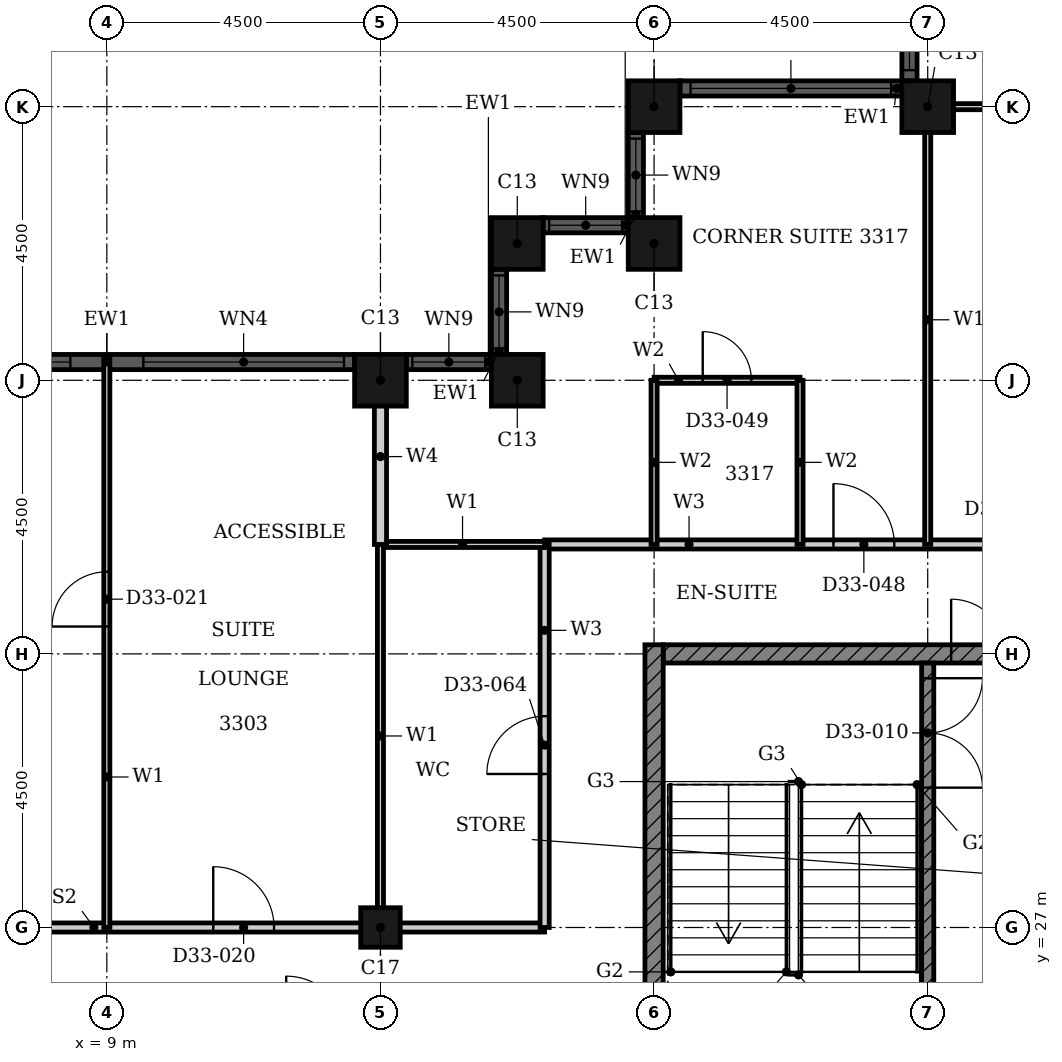
"""IFC4 building model, lengths in metres.
Left out: names, types, materials, properties, quantities, classifications, styles, units other than length and angle.
Written with IfcOpenShell. Run it as: python <this file> out.ifc"""

import sys

from ifc_helpers import new_model, si_unit, direction, frame, frame_2d, origin, origin_2d, place, context, subcontext, project, spatial, rectangle, hollow_rectangle, extrude, element, fill, save


model = new_model("IFC4")
c1 = context("Model", 3, precision=1e-05, world=origin(), true_north=direction((0.0, 1.0)))
c2 = subcontext(c1, "Body", "Model", "MODEL_VIEW")
j1 = project(units=[si_unit("LENGTHUNIT", "METRE"), si_unit("PLANEANGLEUNIT", "RADIAN")], contexts=[c1])
p1 = place(None, origin())
s1 = spatial("IfcSite", under=j1, at=p1, CompositionType="ELEMENT")
p2 = place(p1, origin())
s2 = spatial("IfcBuilding", under=s1, at=p2, CompositionType="ELEMENT")
p3 = place(p2, frame((0.0, 0.0, 133.2)))
s3 = spatial("IfcBuildingStorey", under=s2, at=p3, CompositionType="ELEMENT", Elevation=133.2)
for number, where, z_axis, x_axis in (
    (1, (22.5, 40.5, 0.0), (0.0, 0.0, 1.0), (1.0, 0.0, 0.0)),
    (2, (18.0, 40.5, 0.0), (0.0, 0.0, 1.0), (1.0, 0.0, 0.0)),
    (3, (18.0, 38.25, 0.0), (0.0, 0.0, 1.0), (1.0, 0.0, 0.0)),
    (4, (15.75, 38.25, 0.0), (0.0, 0.0, 1.0), (1.0, 0.0, 0.0)),
    (5, (15.75, 36.0, 0.0), (0.0, 0.0, 1.0), (1.0, 0.0, 0.0)),
    (6, (13.5, 36.0, 0.0), (0.0, 0.0, 1.0), (1.0, 0.0, 0.0)),
):
    element("IfcColumn", number, at=place(p3, frame(where, z_axis=z_axis, x_axis=x_axis)), inside=s3, PredefinedType="COLUMN", context=c2, shape_type="SweptSolid", body=[
        extrude(hollow_rectangle(XDim=0.85, YDim=0.85, WallThickness=0.026, at=origin_2d()), origin(), (0.0, 0.0, 1.0), 3.6),
    ])
p4 = place(p3, frame((13.5, 27.0, 0.0), z_axis=(0.0, 0.0, 1.0), x_axis=(1.0, 0.0, 0.0)))
e7 = element("IfcColumn", 7, at=p4, inside=s3, PredefinedType="COLUMN", context=c2, shape_type="SweptSolid", body=[
    extrude(hollow_rectangle(XDim=0.65, YDim=0.65, WallThickness=0.021, at=origin_2d()), origin(), (0.0, 0.0, 1.0), 3.6),
])
p5 = place(p3, frame((22.2, 49.075, 0.0), z_axis=(0.0, 0.0, 1.0), x_axis=(0.0, -1.0, 0.0)))
e8 = element("IfcWall", 8, at=p5, inside=s3, PredefinedType="SOLIDWALL", context=c2, shape_type="SweptSolid", body=[
    extrude(rectangle(XDim=8.15, YDim=0.25, at=frame_2d((4.075, 0.0))), origin(), (0.0, 0.0, 1.0), 3.6),
])
p6 = place(p5, frame((0.175, 0.0, 0.9)))
e9 = element("IfcOpeningElement", 9, at=p6, cuts=e8, PredefinedType="OPENING", context=c2, shape_type="SweptSolid", body=[
    extrude(rectangle(XDim=3.3, YDim=2.08, at=frame_2d((1.65, 1.04))), frame((0.0, 0.135, 0.0), z_axis=(0.0, -1.0, 0.0), x_axis=(1.0, 0.0, 0.0)), (0.0, 0.0, 1.0), 0.27),
])
p7 = place(p5, frame((4.675, 0.0, 0.9)))
e10 = element("IfcOpeningElement", 10, at=p7, cuts=e8, PredefinedType="OPENING", context=c2, shape_type="SweptSolid", body=[
    extrude(rectangle(XDim=3.3, YDim=2.08, at=frame_2d((1.65, 1.04))), frame((0.0, 0.135, 0.0), z_axis=(0.0, -1.0, 0.0), x_axis=(1.0, 0.0, 0.0)), (0.0, 0.0, 1.0), 0.27),
])
p8 = place(p3, frame((22.075, 40.8, 0.0), z_axis=(0.0, 0.0, 1.0), x_axis=(-1.0, 0.0, 0.0)))
e11 = element("IfcWall", 11, at=p8, inside=s3, PredefinedType="SOLIDWALL", context=c2, shape_type="SweptSolid", body=[
    extrude(rectangle(XDim=3.65, YDim=0.25, at=frame_2d((1.825, 0.0))), origin(), (0.0, 0.0, 1.0), 3.6),
])
p9 = place(p8, frame((0.175, 0.0, 0.9)))
e12 = element("IfcOpeningElement", 12, at=p9, cuts=e11, PredefinedType="OPENING", context=c2, shape_type="SweptSolid", body=[
    extrude(rectangle(XDim=3.3, YDim=2.08, at=frame_2d((1.65, 1.04))), frame((0.0, 0.135, 0.0), z_axis=(0.0, -1.0, 0.0), x_axis=(1.0, 0.0, 0.0)), (0.0, 0.0, 1.0), 0.27),
])
p10 = place(p3, frame((17.7, 40.075, 0.0), z_axis=(0.0, 0.0, 1.0), x_axis=(0.0, -1.0, 0.0)))
e13 = element("IfcWall", 13, at=p10, inside=s3, PredefinedType="SOLIDWALL", context=c2, shape_type="SweptSolid", body=[
    extrude(rectangle(XDim=1.4, YDim=0.25, at=frame_2d((0.7, 0.0))), origin(), (0.0, 0.0, 1.0), 3.6),
])
p11 = place(p10, frame((0.1, 0.0, 0.9)))
e14 = element("IfcOpeningElement", 14, at=p11, cuts=e13, PredefinedType="OPENING", context=c2, shape_type="SweptSolid", body=[
    extrude(rectangle(XDim=1.2, YDim=2.08, at=frame_2d((0.6, 1.04))), frame((0.0, 0.135, 0.0), z_axis=(0.0, -1.0, 0.0), x_axis=(1.0, 0.0, 0.0)), (0.0, 0.0, 1.0), 0.27),
])
p12 = place(p3, frame((17.575, 38.55, 0.0), z_axis=(0.0, 0.0, 1.0), x_axis=(-1.0, 0.0, 0.0)))
e15 = element("IfcWall", 15, at=p12, inside=s3, PredefinedType="SOLIDWALL", context=c2, shape_type="SweptSolid", body=[
    extrude(rectangle(XDim=1.4, YDim=0.25, at=frame_2d((0.7, 0.0))), origin(), (0.0, 0.0, 1.0), 3.6),
])
p13 = place(p12, frame((0.1, 0.0, 0.9)))
e16 = element("IfcOpeningElement", 16, at=p13, cuts=e15, PredefinedType="OPENING", context=c2, shape_type="SweptSolid", body=[
    extrude(rectangle(XDim=1.2, YDim=2.08, at=frame_2d((0.6, 1.04))), frame((0.0, 0.135, 0.0), z_axis=(0.0, -1.0, 0.0), x_axis=(1.0, 0.0, 0.0)), (0.0, 0.0, 1.0), 0.27),
])
p14 = place(p3, frame((15.45, 37.825, 0.0), z_axis=(0.0, 0.0, 1.0), x_axis=(0.0, -1.0, 0.0)))
e17 = element("IfcWall", 17, at=p14, inside=s3, PredefinedType="SOLIDWALL", context=c2, shape_type="SweptSolid", body=[
    extrude(rectangle(XDim=1.4, YDim=0.25, at=frame_2d((0.7, 0.0))), origin(), (0.0, 0.0, 1.0), 3.6),
])
p15 = place(p14, frame((0.1, 0.0, 0.9)))
e18 = element("IfcOpeningElement", 18, at=p15, cuts=e17, PredefinedType="OPENING", context=c2, shape_type="SweptSolid", body=[
    extrude(rectangle(XDim=1.2, YDim=2.08, at=frame_2d((0.6, 1.04))), frame((0.0, 0.135, 0.0), z_axis=(0.0, -1.0, 0.0), x_axis=(1.0, 0.0, 0.0)), (0.0, 0.0, 1.0), 0.27),
])
p16 = place(p3, frame((15.325, 36.3, 0.0), z_axis=(0.0, 0.0, 1.0), x_axis=(-1.0, 0.0, 0.0)))
e19 = element("IfcWall", 19, at=p16, inside=s3, PredefinedType="SOLIDWALL", context=c2, shape_type="SweptSolid", body=[
    extrude(rectangle(XDim=1.4, YDim=0.25, at=frame_2d((0.7, 0.0))), origin(), (0.0, 0.0, 1.0), 3.6),
])
p17 = place(p16, frame((0.1, 0.0, 0.9)))
e20 = element("IfcOpeningElement", 20, at=p17, cuts=e19, PredefinedType="OPENING", context=c2, shape_type="SweptSolid", body=[
    extrude(rectangle(XDim=1.2, YDim=2.08, at=frame_2d((0.6, 1.04))), frame((0.0, 0.135, 0.0), z_axis=(0.0, -1.0, 0.0), x_axis=(1.0, 0.0, 0.0)), (0.0, 0.0, 1.0), 0.27),
])
p18 = place(p3, frame((13.075, 36.3, 0.0), z_axis=(0.0, 0.0, 1.0), x_axis=(-1.0, 0.0, 0.0)))
e21 = element("IfcWall", 21, at=p18, inside=s3, PredefinedType="SOLIDWALL", context=c2, shape_type="SweptSolid", body=[
    extrude(rectangle(XDim=8.15, YDim=0.25, at=frame_2d((4.075, 0.0))), origin(), (0.0, 0.0, 1.0), 3.6),
])
p19 = place(p18, frame((0.175, 0.0, 0.9)))
e22 = element("IfcOpeningElement", 22, at=p19, cuts=e21, PredefinedType="OPENING", context=c2, shape_type="SweptSolid", body=[
    extrude(rectangle(XDim=3.3, YDim=2.08, at=frame_2d((1.65, 1.04))), frame((0.0, 0.135, 0.0), z_axis=(0.0, -1.0, 0.0), x_axis=(1.0, 0.0, 0.0)), (0.0, 0.0, 1.0), 0.27),
])
p20 = place(p18, frame((4.675, 0.0, 0.9)))
e23 = element("IfcOpeningElement", 23, at=p20, cuts=e21, PredefinedType="OPENING", context=c2, shape_type="SweptSolid", body=[
    extrude(rectangle(XDim=3.3, YDim=2.08, at=frame_2d((1.65, 1.04))), frame((0.0, 0.135, 0.0), z_axis=(0.0, -1.0, 0.0), x_axis=(1.0, 0.0, 0.0)), (0.0, 0.0, 1.0), 0.27),
])
p21 = place(p3, frame((18.15, 31.5, 0.0), z_axis=(0.0, 0.0, 1.0), x_axis=(1.0, 0.0, 0.0)))
e24 = element("IfcWall", 24, at=p21, inside=s3, PredefinedType="SHEAR", context=c2, shape_type="SweptSolid", body=[
    extrude(rectangle(XDim=6.797, YDim=0.3, at=frame_2d((3.398, 0.0))), origin(), (0.0, 0.0, 1.0), 3.3),
])
p22 = place(p21, frame((4.736, 0.0, 0.0)))
e25 = element("IfcOpeningElement", 25, at=p22, cuts=e24, PredefinedType="OPENING", context=c2, shape_type="SweptSolid", body=[
    extrude(rectangle(XDim=1.8, YDim=2.1, at=frame_2d((0.9, 1.05))), frame((0.0, 0.16, 0.0), z_axis=(0.0, -1.0, 0.0), x_axis=(1.0, 0.0, 0.0)), (0.0, 0.0, 1.0), 0.32),
])
p23 = place(p3, frame((18.0, 22.35, 0.0), z_axis=(0.0, 0.0, 1.0), x_axis=(0.0, 1.0, 0.0)))
e26 = element("IfcWall", 26, at=p23, inside=s3, PredefinedType="SHEAR", context=c2, shape_type="SweptSolid", body=[
    extrude(rectangle(XDim=9.3, YDim=0.3, at=frame_2d((4.65, 0.0))), origin(), (0.0, 0.0, 1.0), 3.3),
])
p24 = place(p3, frame((22.5, 31.35, 0.0), z_axis=(0.0, 0.0, 1.0), x_axis=(0.0, -1.0, 0.0)))
e27 = element("IfcWall", 27, at=p24, inside=s3, PredefinedType="SHEAR", context=c2, shape_type="SweptSolid", body=[
    extrude(rectangle(XDim=5.825, YDim=0.2, at=frame_2d((2.913, 0.0))), origin(), (0.0, 0.0, 1.0), 3.3),
])
p25 = place(p24, frame((0.25, 0.0, 0.0)))
e28 = element("IfcOpeningElement", 28, at=p25, cuts=e27, PredefinedType="OPENING", context=c2, shape_type="SweptSolid", body=[
    extrude(rectangle(XDim=1.8, YDim=2.1, at=frame_2d((0.9, 1.05))), frame((0.0, 0.11, 0.0), z_axis=(0.0, -1.0, 0.0), x_axis=(1.0, 0.0, 0.0)), (0.0, 0.0, 1.0), 0.22),
])
p26 = place(p3, frame((4.5, 27.0, 0.0), z_axis=(0.0, 0.0, 1.0), x_axis=(1.0, 0.0, 0.0)))
e29 = element("IfcWall", 29, at=p26, inside=s3, PredefinedType="PARTITIONING", context=c2, shape_type="SweptSolid", body=[
    extrude(rectangle(XDim=11.7, YDim=0.15, at=frame_2d((5.85, 0.0))), origin(), (0.0, 0.0, 1.0), 2.58),
])
p27 = place(p26, frame((6.25, 0.0, 0.0)))
e30 = element("IfcOpeningElement", 30, at=p27, cuts=e29, PredefinedType="OPENING", context=c2, shape_type="SweptSolid", body=[
    extrude(rectangle(XDim=1.0, YDim=2.1, at=frame_2d((0.5, 1.05))), frame((0.0, 0.085, 0.0), z_axis=(0.0, -1.0, 0.0), x_axis=(1.0, 0.0, 0.0)), (0.0, 0.0, 1.0), 0.17),
])
p28 = place(p3, frame((16.2, 33.3, 0.0), z_axis=(0.0, 0.0, 1.0), x_axis=(1.0, 0.0, 0.0)))
e31 = element("IfcWall", 31, at=p28, inside=s3, PredefinedType="PARTITIONING", context=c2, shape_type="SweptSolid", body=[
    extrude(rectangle(XDim=15.3, YDim=0.15, at=frame_2d((7.65, 0.0))), origin(), (0.0, 0.0, 1.0), 3.3),
])
p29 = place(p28, frame((4.75, 0.0, 0.0)))
e32 = element("IfcOpeningElement", 32, at=p29, cuts=e31, PredefinedType="OPENING", context=c2, shape_type="SweptSolid", body=[
    extrude(rectangle(XDim=1.0, YDim=2.1, at=frame_2d((0.5, 1.05))), frame((0.0, 0.085, 0.0), z_axis=(0.0, -1.0, 0.0), x_axis=(1.0, 0.0, 0.0)), (0.0, 0.0, 1.0), 0.17),
])
p30 = place(p28, frame((10.35, 0.0, 0.0)))
e33 = element("IfcOpeningElement", 33, at=p30, cuts=e31, PredefinedType="OPENING", context=c2, shape_type="SweptSolid", body=[
    extrude(rectangle(XDim=0.9, YDim=2.1, at=frame_2d((0.45, 1.05))), frame((0.0, 0.085, 0.0), z_axis=(0.0, -1.0, 0.0), x_axis=(1.0, 0.0, 0.0)), (0.0, 0.0, 1.0), 0.17),
])
p31 = place(p3, frame((16.2, 27.0, 0.0), z_axis=(0.0, 0.0, 1.0), x_axis=(0.0, 1.0, 0.0)))
e34 = element("IfcWall", 34, at=p31, inside=s3, PredefinedType="PARTITIONING", context=c2, shape_type="SweptSolid", body=[
    extrude(rectangle(XDim=6.3, YDim=0.15, at=frame_2d((3.15, 0.0))), origin(), (0.0, 0.0, 1.0), 3.3),
])
p32 = place(p31, frame((2.525, 0.0, 0.0)))
e35 = element("IfcOpeningElement", 35, at=p32, cuts=e34, PredefinedType="OPENING", context=c2, shape_type="SweptSolid", body=[
    extrude(rectangle(XDim=0.95, YDim=2.1, at=frame_2d((0.475, 1.05))), frame((0.0, 0.085, 0.0), z_axis=(0.0, -1.0, 0.0), x_axis=(1.0, 0.0, 0.0)), (0.0, 0.0, 1.0), 0.17),
])
p33 = place(p3, frame((13.5, 33.3, 0.0), z_axis=(0.0, 0.0, 1.0), x_axis=(1.0, 0.0, 0.0)))
e36 = element("IfcWall", 36, at=p33, inside=s3, PredefinedType="PARTITIONING", context=c2, shape_type="SweptSolid", body=[
    extrude(rectangle(XDim=2.7, YDim=0.1, at=frame_2d((1.35, 0.0))), origin(), (0.0, 0.0, 1.0), 3.3),
])
p34 = place(p3, frame((22.31, 40.5, 0.0), z_axis=(0.0, 0.0, 1.0), x_axis=(1.0, 0.0, 0.0)))
e37 = element("IfcWall", 37, at=p34, inside=s3, PredefinedType="PARTITIONING", context=c2, shape_type="SweptSolid", body=[
    extrude(rectangle(XDim=9.19, YDim=0.1, at=frame_2d((4.595, 0.0))), origin(), (0.0, 0.0, 1.0), 2.38),
])
p35 = place(p3, frame((13.5, 27.0, 0.0), z_axis=(0.0, 0.0, 1.0), x_axis=(0.0, 1.0, 0.0)))
e38 = element("IfcWall", 38, at=p35, inside=s3, PredefinedType="PARTITIONING", context=c2, shape_type="SweptSolid", body=[
    extrude(rectangle(XDim=6.3, YDim=0.1, at=frame_2d((3.15, 0.0))), origin(), (0.0, 0.0, 1.0), 2.38),
])
p36 = place(p3, frame((22.5, 33.3, 0.0), z_axis=(0.0, 0.0, 1.0), x_axis=(0.0, 1.0, 0.0)))
e39 = element("IfcWall", 39, at=p36, inside=s3, PredefinedType="PARTITIONING", context=c2, shape_type="SweptSolid", body=[
    extrude(rectangle(XDim=7.39, YDim=0.1, at=frame_2d((3.695, 0.0))), origin(), (0.0, 0.0, 1.0), 3.3),
])
p37 = place(p3, frame((9.0, 27.0, 0.0), z_axis=(0.0, 0.0, 1.0), x_axis=(0.0, 1.0, 0.0)))
e40 = element("IfcWall", 40, at=p37, inside=s3, PredefinedType="PARTITIONING", context=c2, shape_type="SweptSolid", body=[
    extrude(rectangle(XDim=9.365, YDim=0.1, at=frame_2d((4.683, 0.0))), origin(), (0.0, 0.0, 1.0), 3.3),
])
p38 = place(p37, frame((4.95, 0.0, 0.0)))
e41 = element("IfcOpeningElement", 41, at=p38, cuts=e40, PredefinedType="OPENING", context=c2, shape_type="SweptSolid", body=[
    extrude(rectangle(XDim=0.9, YDim=2.1, at=frame_2d((0.45, 1.05))), frame((0.0, 0.06, 0.0), z_axis=(0.0, -1.0, 0.0), x_axis=(1.0, 0.0, 0.0)), (0.0, 0.0, 1.0), 0.12),
])
p39 = place(p3, frame((13.5, 33.3, 0.0), z_axis=(0.0, 0.0, 1.0), x_axis=(0.0, 1.0, 0.0)))
e42 = element("IfcWall", 42, at=p39, inside=s3, PredefinedType="PARTITIONING", context=c2, shape_type="SweptSolid", body=[
    extrude(rectangle(XDim=2.89, YDim=0.2, at=frame_2d((1.445, 0.0))), origin(), (0.0, 0.0, 1.0), 2.38),
])
p40 = place(p3, frame((18.0, 36.0, 0.0), z_axis=(0.0, 0.0, 1.0), x_axis=(1.0, 0.0, 0.0)))
e43 = element("IfcWall", 43, at=p40, inside=s3, PredefinedType="PARTITIONING", context=c2, shape_type="SweptSolid", body=[
    extrude(rectangle(XDim=2.4, YDim=0.1, at=frame_2d((1.2, 0.0))), origin(), (0.0, 0.0, 1.0), 3.3),
])
p41 = place(p40, frame((0.8, 0.0, 0.0)))
e44 = element("IfcOpeningElement", 44, at=p41, cuts=e43, PredefinedType="OPENING", context=c2, shape_type="SweptSolid", body=[
    extrude(rectangle(XDim=0.8, YDim=2.1, at=frame_2d((0.4, 1.05))), frame((0.0, 0.06, 0.0), z_axis=(0.0, -1.0, 0.0), x_axis=(1.0, 0.0, 0.0)), (0.0, 0.0, 1.0), 0.12),
])
for number, where, z_axis, x_axis in (
    (45, (18.0, 33.3, 0.0), (0.0, 0.0, 1.0), (0.0, 1.0, 0.0)),
    (46, (20.4, 33.3, 0.0), (0.0, 0.0, 1.0), (0.0, 1.0, 0.0)),
):
    element("IfcWall", number, at=place(p3, frame(where, z_axis=z_axis, x_axis=x_axis)), inside=s3, PredefinedType="PARTITIONING", context=c2, shape_type="SweptSolid", body=[
        extrude(rectangle(XDim=2.7, YDim=0.1, at=frame_2d((1.35, 0.0))), origin(), (0.0, 0.0, 1.0), 3.3),
    ])
p42 = place(p7, origin())
e47 = element("IfcWindow", 47, at=p42, inside=s3, PartitioningType="SINGLE_PANEL", PredefinedType="WINDOW", context=c2, shape_type="SweptSolid", body=[
    extrude(rectangle(XDim=3.3, YDim=2.08, at=frame_2d((1.65, 1.04))), frame((0.0, 0.03, 0.0), z_axis=(0.0, -1.0, 0.0), x_axis=(1.0, 0.0, 0.0)), (0.0, 0.0, 1.0), 0.06),
])
fill(e10, e47)
p43 = place(p9, origin())
e48 = element("IfcWindow", 48, at=p43, inside=s3, PartitioningType="SINGLE_PANEL", PredefinedType="WINDOW", context=c2, shape_type="SweptSolid", body=[
    extrude(rectangle(XDim=3.3, YDim=2.08, at=frame_2d((1.65, 1.04))), frame((0.0, 0.03, 0.0), z_axis=(0.0, -1.0, 0.0), x_axis=(1.0, 0.0, 0.0)), (0.0, 0.0, 1.0), 0.06),
])
fill(e12, e48)
p44 = place(p11, origin())
e49 = element("IfcWindow", 49, at=p44, inside=s3, PartitioningType="SINGLE_PANEL", PredefinedType="WINDOW", context=c2, shape_type="SweptSolid", body=[
    extrude(rectangle(XDim=1.2, YDim=2.08, at=frame_2d((0.6, 1.04))), frame((0.0, 0.03, 0.0), z_axis=(0.0, -1.0, 0.0), x_axis=(1.0, 0.0, 0.0)), (0.0, 0.0, 1.0), 0.06),
])
fill(e14, e49)
p45 = place(p13, origin())
e50 = element("IfcWindow", 50, at=p45, inside=s3, PartitioningType="SINGLE_PANEL", PredefinedType="WINDOW", context=c2, shape_type="SweptSolid", body=[
    extrude(rectangle(XDim=1.2, YDim=2.08, at=frame_2d((0.6, 1.04))), frame((0.0, 0.03, 0.0), z_axis=(0.0, -1.0, 0.0), x_axis=(1.0, 0.0, 0.0)), (0.0, 0.0, 1.0), 0.06),
])
fill(e16, e50)
p46 = place(p15, origin())
e51 = element("IfcWindow", 51, at=p46, inside=s3, PartitioningType="SINGLE_PANEL", PredefinedType="WINDOW", context=c2, shape_type="SweptSolid", body=[
    extrude(rectangle(XDim=1.2, YDim=2.08, at=frame_2d((0.6, 1.04))), frame((0.0, 0.03, 0.0), z_axis=(0.0, -1.0, 0.0), x_axis=(1.0, 0.0, 0.0)), (0.0, 0.0, 1.0), 0.06),
])
fill(e18, e51)
p47 = place(p17, origin())
e52 = element("IfcWindow", 52, at=p47, inside=s3, PartitioningType="SINGLE_PANEL", PredefinedType="WINDOW", context=c2, shape_type="SweptSolid", body=[
    extrude(rectangle(XDim=1.2, YDim=2.08, at=frame_2d((0.6, 1.04))), frame((0.0, 0.03, 0.0), z_axis=(0.0, -1.0, 0.0), x_axis=(1.0, 0.0, 0.0)), (0.0, 0.0, 1.0), 0.06),
])
fill(e20, e52)
p48 = place(p19, origin())
e53 = element("IfcWindow", 53, at=p48, inside=s3, PartitioningType="SINGLE_PANEL", PredefinedType="WINDOW", context=c2, shape_type="SweptSolid", body=[
    extrude(rectangle(XDim=3.3, YDim=2.08, at=frame_2d((1.65, 1.04))), frame((0.0, 0.03, 0.0), z_axis=(0.0, -1.0, 0.0), x_axis=(1.0, 0.0, 0.0)), (0.0, 0.0, 1.0), 0.06),
])
fill(e22, e53)
p49 = place(p20, origin())
e54 = element("IfcWindow", 54, at=p49, inside=s3, PartitioningType="SINGLE_PANEL", PredefinedType="WINDOW", context=c2, shape_type="SweptSolid", body=[
    extrude(rectangle(XDim=3.3, YDim=2.08, at=frame_2d((1.65, 1.04))), frame((0.0, 0.03, 0.0), z_axis=(0.0, -1.0, 0.0), x_axis=(1.0, 0.0, 0.0)), (0.0, 0.0, 1.0), 0.06),
])
fill(e23, e54)
p50 = place(p25, origin())
e55 = element("IfcDoor", 55, at=p50, inside=s3, OperationType="DOUBLE_DOOR_SINGLE_SWING", PredefinedType="DOOR", context=c2, shape_type="SweptSolid", body=[
    extrude(rectangle(XDim=1.8, YDim=2.1, at=frame_2d((0.9, 1.05))), frame((0.0, 0.025, 0.0), z_axis=(0.0, -1.0, 0.0), x_axis=(1.0, 0.0, 0.0)), (0.0, 0.0, 1.0), 0.05),
])
fill(e28, e55)
p51 = place(p22, origin())
e56 = element("IfcDoor", 56, at=p51, inside=s3, OperationType="DOUBLE_DOOR_SINGLE_SWING", PredefinedType="DOOR", context=c2, shape_type="SweptSolid", body=[
    extrude(rectangle(XDim=1.8, YDim=2.1, at=frame_2d((0.9, 1.05))), frame((0.0, 0.025, 0.0), z_axis=(0.0, -1.0, 0.0), x_axis=(1.0, 0.0, 0.0)), (0.0, 0.0, 1.0), 0.05),
])
fill(e25, e56)
p52 = place(p27, origin())
e57 = element("IfcDoor", 57, at=p52, inside=s3, OperationType="SINGLE_SWING_LEFT", PredefinedType="DOOR", context=c2, shape_type="SweptSolid", body=[
    extrude(rectangle(XDim=1.0, YDim=2.1, at=frame_2d((0.5, 1.05))), frame((0.0, 0.025, 0.0), z_axis=(0.0, -1.0, 0.0), x_axis=(1.0, 0.0, 0.0)), (0.0, 0.0, 1.0), 0.05),
])
fill(e30, e57)
p53 = place(p38, origin())
e58 = element("IfcDoor", 58, at=p53, inside=s3, OperationType="SINGLE_SWING_RIGHT", PredefinedType="DOOR", context=c2, shape_type="SweptSolid", body=[
    extrude(rectangle(XDim=0.9, YDim=2.1, at=frame_2d((0.45, 1.05))), frame((0.0, 0.025, 0.0), z_axis=(0.0, -1.0, 0.0), x_axis=(1.0, 0.0, 0.0)), (0.0, 0.0, 1.0), 0.05),
])
fill(e41, e58)
p54 = place(p29, origin())
e59 = element("IfcDoor", 59, at=p54, inside=s3, OperationType="SINGLE_SWING_RIGHT", PredefinedType="DOOR", context=c2, shape_type="SweptSolid", body=[
    extrude(rectangle(XDim=1.0, YDim=2.1, at=frame_2d((0.5, 1.05))), frame((0.0, 0.025, 0.0), z_axis=(0.0, -1.0, 0.0), x_axis=(1.0, 0.0, 0.0)), (0.0, 0.0, 1.0), 0.05),
])
fill(e32, e59)
p55 = place(p41, origin())
e60 = element("IfcDoor", 60, at=p55, inside=s3, OperationType="SINGLE_SWING_RIGHT", PredefinedType="DOOR", context=c2, shape_type="SweptSolid", body=[
    extrude(rectangle(XDim=0.8, YDim=2.1, at=frame_2d((0.4, 1.05))), frame((0.0, 0.025, 0.0), z_axis=(0.0, -1.0, 0.0), x_axis=(1.0, 0.0, 0.0)), (0.0, 0.0, 1.0), 0.05),
])
fill(e44, e60)
p56 = place(p32, origin())
e61 = element("IfcDoor", 61, at=p56, inside=s3, OperationType="SINGLE_SWING_LEFT", PredefinedType="DOOR", context=c2, shape_type="SweptSolid", body=[
    extrude(rectangle(XDim=0.95, YDim=2.1, at=frame_2d((0.475, 1.05))), frame((0.0, 0.025, 0.0), z_axis=(0.0, -1.0, 0.0), x_axis=(1.0, 0.0, 0.0)), (0.0, 0.0, 1.0), 0.05),
])
fill(e35, e61)
save(model, sys.argv[1])
